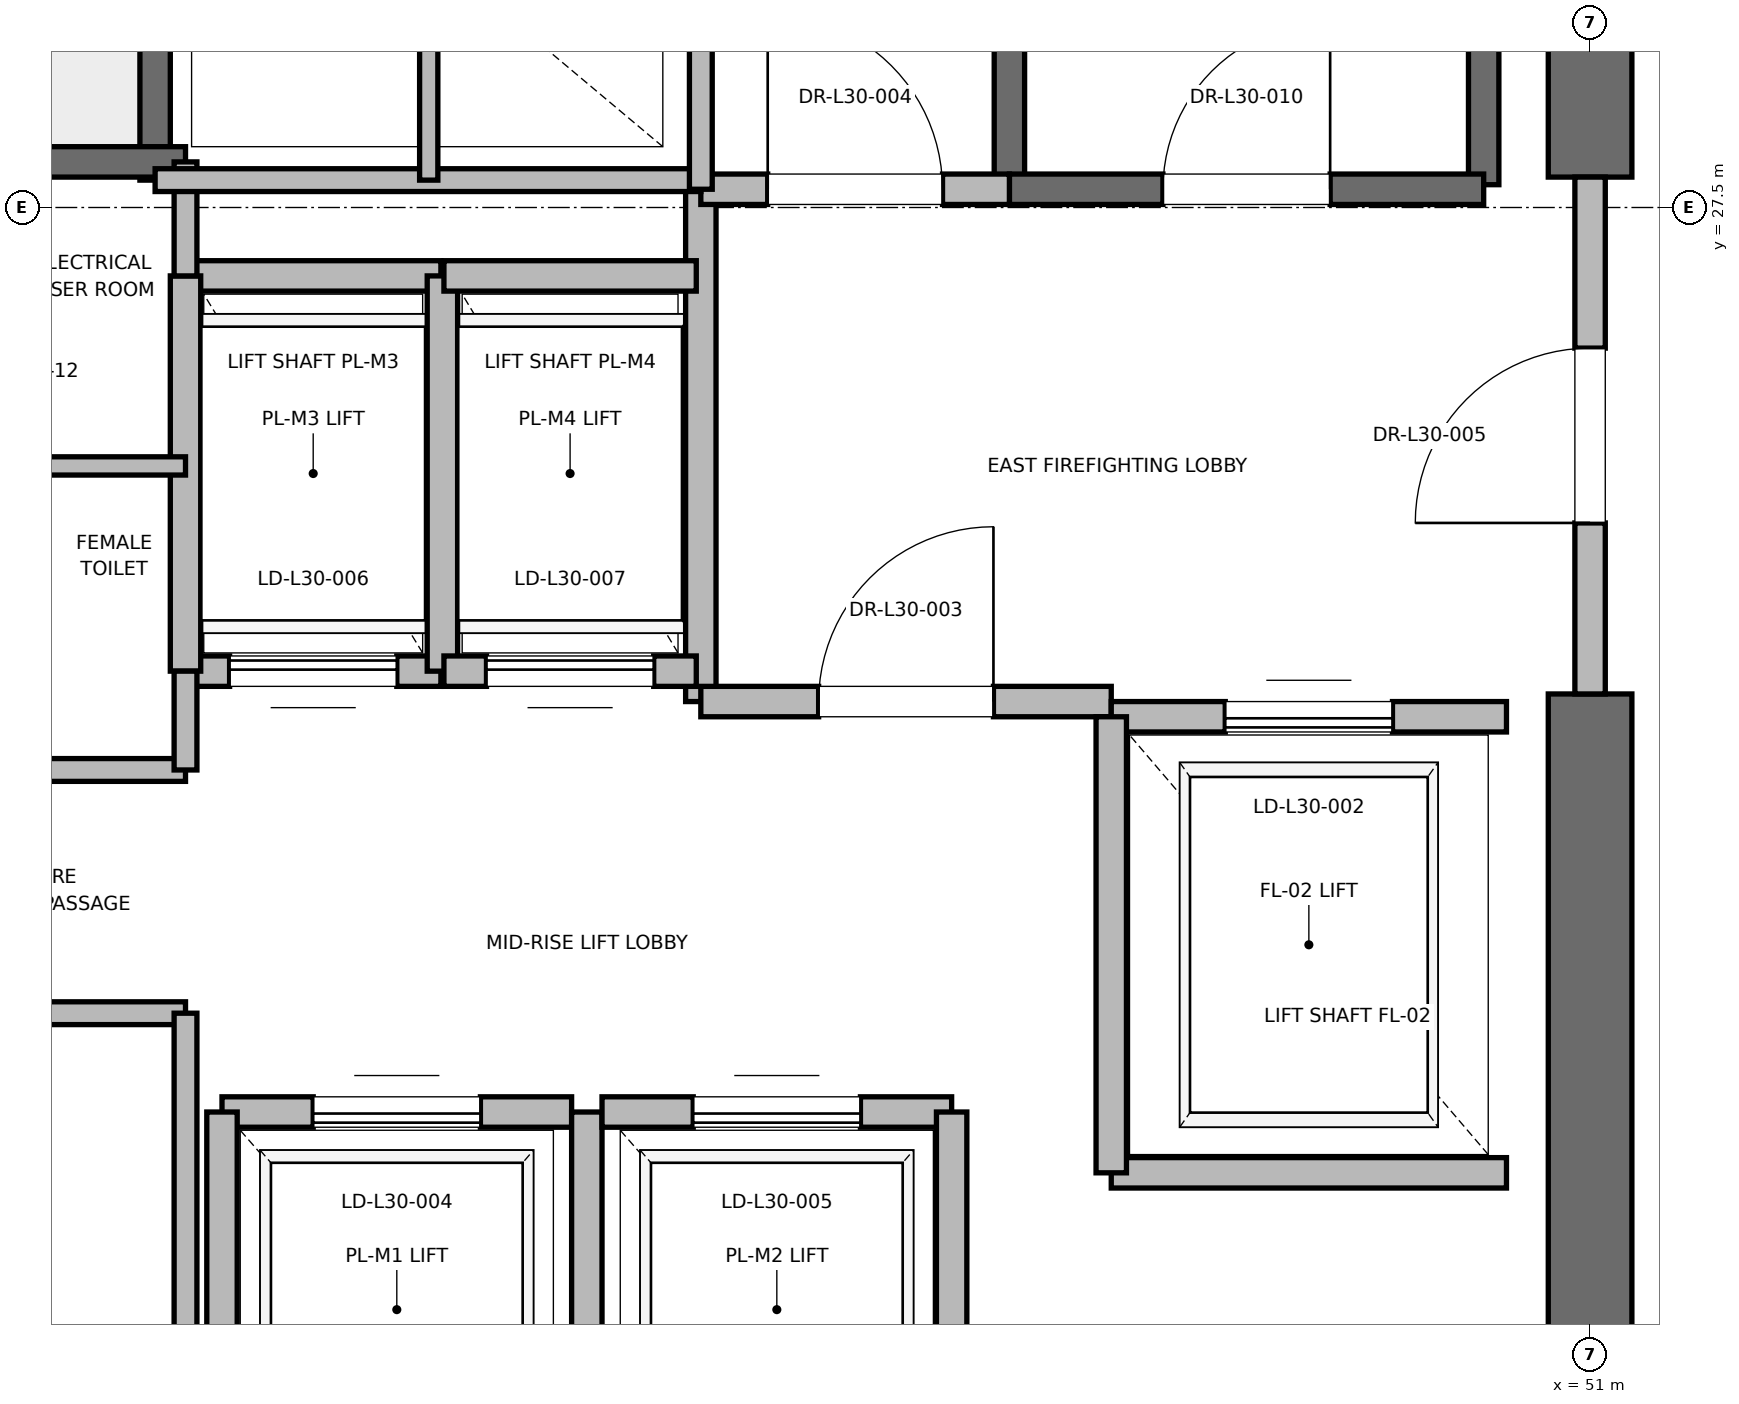
"""IFC4 building model, lengths in metres.
Left out: names, types, materials, properties, quantities, classifications, styles, units other than length and angle.
Written with IfcOpenShell. Run it as: python <this file> out.ifc"""

import sys

from ifc_helpers import new_model, si_unit, direction, frame, frame_2d, origin, place, context, subcontext, project, spatial, rectangle, extrude, element, fill, save


model = new_model("IFC4")
c1 = context("Model", 3, precision=1e-05, world=origin(), true_north=direction((0.0, 1.0)))
c2 = subcontext(c1, "Body", "Model", "MODEL_VIEW")
j1 = project(units=[si_unit("LENGTHUNIT", "METRE"), si_unit("PLANEANGLEUNIT", "RADIAN")], contexts=[c1])
p1 = place(None, origin())
s1 = spatial("IfcSite", under=j1, at=p1, CompositionType="ELEMENT")
p2 = place(p1, origin())
s2 = spatial("IfcBuilding", under=s1, at=p2, CompositionType="ELEMENT")
p3 = place(p2, frame((0.0, 0.0, 132.4)))
s3 = spatial("IfcBuildingStorey", under=s2, at=p3, CompositionType="ELEMENT", Elevation=132.4)
p4 = place(p3, frame((51.0, 18.5, 0.0), z_axis=(0.0, 0.0, 1.0), x_axis=(0.0, 1.0, 0.0)))
e1 = element("IfcWall", 1, at=p4, inside=s3, PredefinedType="SHEAR", context=c2, shape_type="SweptSolid", body=[
    extrude(rectangle(XDim=5.8, YDim=0.55, at=frame_2d((2.9, 0.0))), origin(), (0.0, 0.0, 1.0), 3.775),
])
p5 = place(p3, frame((51.0, 27.7, 0.0), z_axis=(0.0, 0.0, 1.0), x_axis=(0.0, 1.0, 0.0)))
e2 = element("IfcWall", 2, at=p5, inside=s3, PredefinedType="SHEAR", context=c2, shape_type="SweptSolid", body=[
    extrude(rectangle(XDim=8.8, YDim=0.55, at=frame_2d((4.4, 0.0))), origin(), (0.0, 0.0, 1.0), 3.775),
])
p6 = place(p3, frame((50.3, 27.65, 0.0), z_axis=(0.0, 0.0, 1.0), x_axis=(0.0, 1.0, 0.0)))
e3 = element("IfcWall", 3, at=p6, inside=s3, PredefinedType="SOLIDWALL", context=c2, shape_type="SweptSolid", body=[
    extrude(rectangle(XDim=8.15, YDim=0.2, at=frame_2d((4.075, 0.0))), origin(), (0.0, 0.0, 1.0), 3.775),
])
p7 = place(p3, frame((47.18, 27.62, 0.0), z_axis=(0.0, 0.0, 1.0), x_axis=(0.0, 1.0, 0.0)))
e4 = element("IfcWall", 4, at=p7, inside=s3, PredefinedType="SOLIDWALL", context=c2, shape_type="SweptSolid", body=[
    extrude(rectangle(XDim=8.18, YDim=0.2, at=frame_2d((4.09, 0.0))), origin(), (0.0, 0.0, 1.0), 3.775),
])
p8 = place(p3, frame((47.18, 27.62, 0.0), z_axis=(0.0, 0.0, 1.0), x_axis=(1.0, 0.0, 0.0)))
e5 = element("IfcWall", 5, at=p8, inside=s3, PredefinedType="SOLIDWALL", context=c2, shape_type="SweptSolid", body=[
    extrude(rectangle(XDim=3.12, YDim=0.2, at=frame_2d((1.56, 0.0))), origin(), (0.0, 0.0, 1.0), 3.775),
])
p9 = place(p8, frame((1.01, 0.0, 0.0)))
e6 = element("IfcOpeningElement", 6, at=p9, cuts=e5, PredefinedType="OPENING", context=c2, shape_type="SweptSolid", body=[
    extrude(rectangle(XDim=1.1, YDim=2.15, at=frame_2d((0.55, 1.075))), frame((0.0, 0.1, 0.0), z_axis=(0.0, -1.0, 0.0), x_axis=(1.0, 0.0, 0.0)), (0.0, 0.0, 1.0), 0.2),
])
p10 = place(p3, frame((41.56, 27.68, 0.0), z_axis=(0.0, 0.0, 1.0), x_axis=(0.0, 1.0, 0.0)))
e7 = element("IfcWall", 7, at=p10, inside=s3, PredefinedType="SOLIDWALL", context=c2, shape_type="SweptSolid", body=[
    extrude(rectangle(XDim=8.57, YDim=0.2, at=frame_2d((4.285, 0.0))), origin(), (0.0, 0.0, 1.0), 3.775),
])
p11 = place(p3, frame((38.44, 27.8, 0.0), z_axis=(0.0, 0.0, 1.0), x_axis=(1.0, 0.0, 0.0)))
e8 = element("IfcWall", 8, at=p11, inside=s3, PredefinedType="SOLIDWALL", context=c2, shape_type="SweptSolid", body=[
    extrude(rectangle(XDim=3.32, YDim=0.2, at=frame_2d((1.66, 0.0))), origin(), (0.0, 0.0, 1.0), 3.775),
])
p12 = place(p3, frame((45.15, 24.25, 0.0), z_axis=(0.0, 0.0, 1.0), x_axis=(0.0, 1.0, 0.0)))
e9 = element("IfcWall", 9, at=p12, inside=s3, PredefinedType="PARTITIONING", context=c2, shape_type="SweptSolid", body=[
    extrude(rectangle(XDim=3.37, YDim=0.2, at=frame_2d((1.685, 0.0))), origin(), (0.0, 0.0, 1.0), 3.775),
])
p13 = place(p3, frame((45.15, 24.25, 0.0), z_axis=(0.0, 0.0, 1.0), x_axis=(1.0, 0.0, 0.0)))
e10 = element("IfcWall", 10, at=p13, inside=s3, PredefinedType="PARTITIONING", context=c2, shape_type="SweptSolid", body=[
    extrude(rectangle(XDim=2.7, YDim=0.2, at=frame_2d((1.35, 0.0))), origin(), (0.0, 0.0, 1.0), 3.775),
])
p14 = place(p13, frame((0.775, 0.0, 0.0)))
e11 = element("IfcOpeningElement", 11, at=p14, cuts=e10, PredefinedType="OPENING", context=c2, shape_type="SweptSolid", body=[
    extrude(rectangle(XDim=1.15, YDim=2.2, at=frame_2d((0.575, 1.1))), frame((0.0, 0.1, 0.0), z_axis=(0.0, -1.0, 0.0), x_axis=(1.0, 0.0, 0.0)), (0.0, 0.0, 1.0), 0.2),
])
p15 = place(p3, frame((45.15, 27.62, 0.0), z_axis=(0.0, 0.0, 1.0), x_axis=(1.0, 0.0, 0.0)))
e12 = element("IfcWall", 12, at=p15, inside=s3, PredefinedType="PARTITIONING", context=c2, shape_type="SweptSolid", body=[
    extrude(rectangle(XDim=2.03, YDim=0.2, at=frame_2d((1.015, 0.0))), origin(), (0.0, 0.0, 1.0), 3.775),
])
p16 = place(p15, frame((0.44, 0.0, 0.0)))
e13 = element("IfcOpeningElement", 13, at=p16, cuts=e12, PredefinedType="OPENING", context=c2, shape_type="SweptSolid", body=[
    extrude(rectangle(XDim=1.15, YDim=2.2, at=frame_2d((0.575, 1.1))), frame((0.0, 0.1, 0.0), z_axis=(0.0, -1.0, 0.0), x_axis=(1.0, 0.0, 0.0)), (0.0, 0.0, 1.0), 0.2),
])
p17 = place(p3, frame((51.0, 24.3, 0.0), z_axis=(0.0, 0.0, 1.0), x_axis=(0.0, 1.0, 0.0)))
e14 = element("IfcWall", 14, at=p17, inside=s3, PredefinedType="PARTITIONING", context=c2, shape_type="SweptSolid", body=[
    extrude(rectangle(XDim=3.4, YDim=0.2, at=frame_2d((1.7, 0.0))), origin(), (0.0, 0.0, 1.0), 2.755),
])
p18 = place(p17, frame((1.125, 0.0, 0.0)))
e15 = element("IfcOpeningElement", 15, at=p18, cuts=e14, PredefinedType="OPENING", context=c2, shape_type="SweptSolid", body=[
    extrude(rectangle(XDim=1.15, YDim=2.2, at=frame_2d((0.575, 1.1))), frame((0.0, 0.1, 0.0), z_axis=(0.0, -1.0, 0.0), x_axis=(1.0, 0.0, 0.0)), (0.0, 0.0, 1.0), 0.2),
])
p19 = place(p3, frame((47.85, 21.15, 0.0), z_axis=(0.0, 0.0, 1.0), x_axis=(1.0, 0.0, 0.0)))
e16 = element("IfcWall", 16, at=p19, inside=s3, PredefinedType="SOLIDWALL", context=c2, shape_type="SweptSolid", body=[
    extrude(rectangle(XDim=2.6, YDim=0.2, at=frame_2d((1.3, 0.0))), origin(), (0.0, 0.0, 1.0), 3.775),
])
p20 = place(p3, frame((50.45, 24.15, 0.0), z_axis=(0.0, 0.0, 1.0), x_axis=(-1.0, 0.0, 0.0)))
e17 = element("IfcWall", 17, at=p20, inside=s3, PredefinedType="SOLIDWALL", context=c2, shape_type="SweptSolid", body=[
    extrude(rectangle(XDim=2.6, YDim=0.2, at=frame_2d((1.3, 0.0))), origin(), (0.0, 0.0, 1.0), 2.755),
])
p21 = place(p20, frame((0.75, 0.0, 0.0)))
e18 = element("IfcOpeningElement", 18, at=p21, cuts=e17, PredefinedType="OPENING", context=c2, shape_type="SweptSolid", body=[
    extrude(rectangle(XDim=1.1, YDim=2.2, at=frame_2d((0.55, 1.1))), frame((0.0, 0.1, 0.0), z_axis=(0.0, -1.0, 0.0), x_axis=(1.0, 0.0, 0.0)), (0.0, 0.0, 1.0), 0.2),
])
p22 = place(p3, frame((47.85, 24.15, 0.0), z_axis=(0.0, 0.0, 1.0), x_axis=(0.0, -1.0, 0.0)))
e19 = element("IfcWall", 19, at=p22, inside=s3, PredefinedType="SOLIDWALL", context=c2, shape_type="SweptSolid", body=[
    extrude(rectangle(XDim=3.0, YDim=0.2, at=frame_2d((1.5, 0.0))), origin(), (0.0, 0.0, 1.0), 3.775),
])
p23 = place(p3, frame((44.3, 21.55, 0.0), z_axis=(0.0, 0.0, 1.0), x_axis=(-1.0, 0.0, 0.0)))
e20 = element("IfcWall", 20, at=p23, inside=s3, PredefinedType="SOLIDWALL", context=c2, shape_type="SweptSolid", body=[
    extrude(rectangle(XDim=2.3, YDim=0.2, at=frame_2d((1.15, 0.0))), origin(), (0.0, 0.0, 1.0), 3.775),
])
p24 = place(p23, frame((0.6, 0.0, 0.0)))
e21 = element("IfcOpeningElement", 21, at=p24, cuts=e20, PredefinedType="OPENING", context=c2, shape_type="SweptSolid", body=[
    extrude(rectangle(XDim=1.1, YDim=2.2, at=frame_2d((0.55, 1.1))), frame((0.0, 0.1, 0.0), z_axis=(0.0, -1.0, 0.0), x_axis=(1.0, 0.0, 0.0)), (0.0, 0.0, 1.0), 0.2),
])
p25 = place(p3, frame((42.0, 21.55, 0.0), z_axis=(0.0, 0.0, 1.0), x_axis=(0.0, -1.0, 0.0)))
e22 = element("IfcWall", 22, at=p25, inside=s3, PredefinedType="SOLIDWALL", context=c2, shape_type="SweptSolid", body=[
    extrude(rectangle(XDim=2.6, YDim=0.2, at=frame_2d((1.3, 0.0))), origin(), (0.0, 0.0, 1.0), 2.755),
])
p26 = place(p3, frame((44.4, 18.95, 0.0), z_axis=(0.0, 0.0, 1.0), x_axis=(0.0, 1.0, 0.0)))
e23 = element("IfcWall", 23, at=p26, inside=s3, PredefinedType="SOLIDWALL", context=c2, shape_type="SweptSolid", body=[
    extrude(rectangle(XDim=2.6, YDim=0.2, at=frame_2d((1.3, 0.0))), origin(), (0.0, 0.0, 1.0), 3.775),
])
p27 = place(p3, frame((46.8, 21.55, 0.0), z_axis=(0.0, 0.0, 1.0), x_axis=(-1.0, 0.0, 0.0)))
e24 = element("IfcWall", 24, at=p27, inside=s3, PredefinedType="SOLIDWALL", context=c2, shape_type="SweptSolid", body=[
    extrude(rectangle(XDim=2.3, YDim=0.2, at=frame_2d((1.15, 0.0))), origin(), (0.0, 0.0, 1.0), 3.775),
])
p28 = place(p27, frame((0.6, 0.0, 0.0)))
e25 = element("IfcOpeningElement", 25, at=p28, cuts=e24, PredefinedType="OPENING", context=c2, shape_type="SweptSolid", body=[
    extrude(rectangle(XDim=1.1, YDim=2.2, at=frame_2d((0.55, 1.1))), frame((0.0, 0.1, 0.0), z_axis=(0.0, -1.0, 0.0), x_axis=(1.0, 0.0, 0.0)), (0.0, 0.0, 1.0), 0.2),
])
p29 = place(p3, frame((46.8, 18.95, 0.0), z_axis=(0.0, 0.0, 1.0), x_axis=(0.0, 1.0, 0.0)))
e26 = element("IfcWall", 26, at=p29, inside=s3, PredefinedType="SOLIDWALL", context=c2, shape_type="SweptSolid", body=[
    extrude(rectangle(XDim=2.6, YDim=0.2, at=frame_2d((1.3, 0.0))), origin(), (0.0, 0.0, 1.0), 3.775),
])
p30 = place(p3, frame((41.76, 24.45, 0.0), z_axis=(0.0, 0.0, 1.0), x_axis=(1.0, 0.0, 0.0)))
e27 = element("IfcWall", 27, at=p30, inside=s3, PredefinedType="SOLIDWALL", context=c2, shape_type="SweptSolid", body=[
    extrude(rectangle(XDim=1.68, YDim=0.2, at=frame_2d((0.84, 0.0))), origin(), (0.0, 0.0, 1.0), 3.775),
])
p31 = place(p30, frame((0.29, 0.0, 0.0)))
e28 = element("IfcOpeningElement", 28, at=p31, cuts=e27, PredefinedType="OPENING", context=c2, shape_type="SweptSolid", body=[
    extrude(rectangle(XDim=1.1, YDim=2.2, at=frame_2d((0.55, 1.1))), frame((0.0, 0.1, 0.0), z_axis=(0.0, -1.0, 0.0), x_axis=(1.0, 0.0, 0.0)), (0.0, 0.0, 1.0), 0.2),
])
p32 = place(p3, frame((43.44, 27.05, 0.0), z_axis=(0.0, 0.0, 1.0), x_axis=(-1.0, 0.0, 0.0)))
e29 = element("IfcWall", 29, at=p32, inside=s3, PredefinedType="SOLIDWALL", context=c2, shape_type="SweptSolid", body=[
    extrude(rectangle(XDim=1.68, YDim=0.2, at=frame_2d((0.84, 0.0))), origin(), (0.0, 0.0, 1.0), 3.775),
])
for number, where, z_axis, x_axis in (
    (30, (41.76, 27.05, 0.0), (0.0, 0.0, 1.0), (0.0, -1.0, 0.0)),
    (31, (43.45, 24.45, 0.0), (0.0, 0.0, 1.0), (0.0, 1.0, 0.0)),
):
    element("IfcWall", number, at=place(p3, frame(where, z_axis=z_axis, x_axis=x_axis)), inside=s3, PredefinedType="SOLIDWALL", context=c2, shape_type="SweptSolid", body=[
        extrude(rectangle(XDim=2.6, YDim=0.2, at=frame_2d((1.3, 0.0))), origin(), (0.0, 0.0, 1.0), 3.775),
    ])
p33 = place(p3, frame((43.46, 24.45, 0.0), z_axis=(0.0, 0.0, 1.0), x_axis=(1.0, 0.0, 0.0)))
e32 = element("IfcWall", 32, at=p33, inside=s3, PredefinedType="SOLIDWALL", context=c2, shape_type="SweptSolid", body=[
    extrude(rectangle(XDim=1.66, YDim=0.2, at=frame_2d((0.83, 0.0))), origin(), (0.0, 0.0, 1.0), 3.775),
])
p34 = place(p33, frame((0.28, 0.0, 0.0)))
e33 = element("IfcOpeningElement", 33, at=p34, cuts=e32, PredefinedType="OPENING", context=c2, shape_type="SweptSolid", body=[
    extrude(rectangle(XDim=1.1, YDim=2.2, at=frame_2d((0.55, 1.1))), frame((0.0, 0.1, 0.0), z_axis=(0.0, -1.0, 0.0), x_axis=(1.0, 0.0, 0.0)), (0.0, 0.0, 1.0), 0.2),
])
p35 = place(p3, frame((45.12, 27.05, 0.0), z_axis=(0.0, 0.0, 1.0), x_axis=(-1.0, 0.0, 0.0)))
e34 = element("IfcWall", 34, at=p35, inside=s3, PredefinedType="SOLIDWALL", context=c2, shape_type="SweptSolid", body=[
    extrude(rectangle(XDim=1.66, YDim=0.2, at=frame_2d((0.83, 0.0))), origin(), (0.0, 0.0, 1.0), 3.775),
])
for number, where, z_axis, x_axis in (
    (35, (39.95, 22.2, 0.0), (0.0, 0.0, 1.0), (1.0, 0.0, 0.0)),
    (36, (39.95, 23.8, 0.0), (0.0, 0.0, 1.0), (1.0, 0.0, 0.0)),
):
    element("IfcWall", number, at=place(p3, frame(where, z_axis=z_axis, x_axis=x_axis)), inside=s3, PredefinedType="PARTITIONING", context=c2, shape_type="SweptSolid", body=[
        extrude(rectangle(XDim=1.81, YDim=0.15, at=frame_2d((0.905, 0.0))), origin(), (0.0, 0.0, 1.0), 2.85),
    ])
p36 = place(p3, frame((39.95, 25.8, 0.0), z_axis=(0.0, 0.0, 1.0), x_axis=(1.0, 0.0, 0.0)))
e37 = element("IfcWall", 37, at=p36, inside=s3, PredefinedType="PARTITIONING", context=c2, shape_type="SweptSolid", body=[
    extrude(rectangle(XDim=1.81, YDim=0.12, at=frame_2d((0.905, 0.0))), origin(), (0.0, 0.0, 1.0), 2.85),
])
p37 = place(p3, frame((41.76, 18.6, 0.0), z_axis=(0.0, 0.0, 1.0), x_axis=(0.0, 1.0, 0.0)))
e38 = element("IfcWall", 38, at=p37, inside=s3, PredefinedType="PARTITIONING", context=c2, shape_type="SweptSolid", body=[
    extrude(rectangle(XDim=3.6, YDim=0.15, at=frame_2d((1.8, 0.0))), origin(), (0.0, 0.0, 1.0), 2.755),
])
p38 = place(p3, frame((41.76, 23.8, 0.0), z_axis=(0.0, 0.0, 1.0), x_axis=(0.0, 1.0, 0.0)))
e39 = element("IfcWall", 39, at=p38, inside=s3, PredefinedType="PARTITIONING", context=c2, shape_type="SweptSolid", body=[
    extrude(rectangle(XDim=0.65, YDim=0.15, at=frame_2d((0.325, 0.0))), origin(), (0.0, 0.0, 1.0), 2.85),
])
p39 = place(p3, frame((41.76, 27.05, 0.0), z_axis=(0.0, 0.0, 1.0), x_axis=(0.0, 1.0, 0.0)))
e40 = element("IfcWall", 40, at=p39, inside=s3, PredefinedType="PARTITIONING", context=c2, shape_type="SweptSolid", body=[
    extrude(rectangle(XDim=0.75, YDim=0.15, at=frame_2d((0.375, 0.0))), origin(), (0.0, 0.0, 1.0), 2.85),
])
p40 = place(p3, frame((41.56, 27.68, 0.0), z_axis=(0.0, 0.0, 1.0), x_axis=(1.0, 0.0, 0.0)))
e41 = element("IfcWall", 41, at=p40, inside=s3, PredefinedType="PARTITIONING", context=c2, shape_type="SweptSolid", body=[
    extrude(rectangle(XDim=3.59, YDim=0.15, at=frame_2d((1.795, 0.0))), origin(), (0.0, 0.0, 1.0), 2.85),
])
p41 = place(p3, frame((45.15, 27.62, 0.0), z_axis=(0.0, 0.0, 1.0), x_axis=(0.0, 1.0, 0.0)))
e42 = element("IfcWall", 42, at=p41, inside=s3, PredefinedType="PARTITIONING", context=c2, shape_type="SweptSolid", body=[
    extrude(rectangle(XDim=3.1, YDim=0.15, at=frame_2d((1.55, 0.0))), origin(), (0.0, 0.0, 1.0), 2.85),
])
p42 = place(p3, frame((43.36, 27.68, 0.0), z_axis=(0.0, 0.0, 1.0), x_axis=(0.0, 1.0, 0.0)))
e43 = element("IfcWall", 43, at=p42, inside=s3, PredefinedType="PARTITIONING", context=c2, shape_type="SweptSolid", body=[
    extrude(rectangle(XDim=3.04, YDim=0.12, at=frame_2d((1.52, 0.0))), origin(), (0.0, 0.0, 1.0), 2.85),
])
p43 = place(p9, origin())
e44 = element("IfcDoor", 44, at=p43, inside=s3, OperationType="SINGLE_SWING_RIGHT", PredefinedType="DOOR", context=c2, shape_type="SweptSolid", body=[
    extrude(rectangle(XDim=1.1, YDim=2.15, at=frame_2d((0.55, 1.075))), frame((0.0, 0.025, 0.0), z_axis=(0.0, -1.0, 0.0), x_axis=(1.0, 0.0, 0.0)), (0.0, 0.0, 1.0), 0.05),
])
fill(e6, e44)
p44 = place(p14, origin())
e45 = element("IfcDoor", 45, at=p44, inside=s3, OperationType="SINGLE_SWING_RIGHT", PredefinedType="DOOR", context=c2, shape_type="SweptSolid", body=[
    extrude(rectangle(XDim=1.15, YDim=2.2, at=frame_2d((0.575, 1.1))), frame((0.0, 0.025, 0.0), z_axis=(0.0, -1.0, 0.0), x_axis=(1.0, 0.0, 0.0)), (0.0, 0.0, 1.0), 0.05),
])
fill(e11, e45)
p45 = place(p16, origin())
e46 = element("IfcDoor", 46, at=p45, inside=s3, OperationType="SINGLE_SWING_LEFT", PredefinedType="DOOR", context=c2, shape_type="SweptSolid", body=[
    extrude(rectangle(XDim=1.15, YDim=2.2, at=frame_2d((0.575, 1.1))), frame((0.0, 0.025, 0.0), z_axis=(0.0, -1.0, 0.0), x_axis=(1.0, 0.0, 0.0)), (0.0, 0.0, 1.0), 0.05),
])
fill(e13, e46)
p46 = place(p18, origin())
e47 = element("IfcDoor", 47, at=p46, inside=s3, OperationType="SINGLE_SWING_LEFT", PredefinedType="DOOR", context=c2, shape_type="SweptSolid", body=[
    extrude(rectangle(XDim=1.15, YDim=2.2, at=frame_2d((0.575, 1.1))), frame((0.0, 0.025, 0.0), z_axis=(0.0, -1.0, 0.0), x_axis=(1.0, 0.0, 0.0)), (0.0, 0.0, 1.0), 0.05),
])
fill(e15, e47)
p47 = place(p21, origin())
e48 = element("IfcDoor", 48, at=p47, inside=s3, OperationType="SLIDING_TO_RIGHT", PredefinedType="DOOR", context=c2, shape_type="SweptSolid", body=[
    extrude(rectangle(XDim=1.1, YDim=2.2, at=frame_2d((0.55, 1.1))), frame((0.0, 0.025, 0.0), z_axis=(0.0, -1.0, 0.0), x_axis=(1.0, 0.0, 0.0)), (0.0, 0.0, 1.0), 0.05),
])
fill(e18, e48)
p48 = place(p24, origin())
e49 = element("IfcDoor", 49, at=p48, inside=s3, OperationType="SLIDING_TO_RIGHT", PredefinedType="DOOR", context=c2, shape_type="SweptSolid", body=[
    extrude(rectangle(XDim=1.1, YDim=2.2, at=frame_2d((0.55, 1.1))), frame((0.0, 0.025, 0.0), z_axis=(0.0, -1.0, 0.0), x_axis=(1.0, 0.0, 0.0)), (0.0, 0.0, 1.0), 0.05),
])
fill(e21, e49)
p49 = place(p28, origin())
e50 = element("IfcDoor", 50, at=p49, inside=s3, OperationType="SLIDING_TO_RIGHT", PredefinedType="DOOR", context=c2, shape_type="SweptSolid", body=[
    extrude(rectangle(XDim=1.1, YDim=2.2, at=frame_2d((0.55, 1.1))), frame((0.0, 0.025, 0.0), z_axis=(0.0, -1.0, 0.0), x_axis=(1.0, 0.0, 0.0)), (0.0, 0.0, 1.0), 0.05),
])
fill(e25, e50)
p50 = place(p31, origin())
e51 = element("IfcDoor", 51, at=p50, inside=s3, OperationType="SLIDING_TO_RIGHT", PredefinedType="DOOR", context=c2, shape_type="SweptSolid", body=[
    extrude(rectangle(XDim=1.1, YDim=2.2, at=frame_2d((0.55, 1.1))), frame((0.0, 0.025, 0.0), z_axis=(0.0, -1.0, 0.0), x_axis=(1.0, 0.0, 0.0)), (0.0, 0.0, 1.0), 0.05),
])
fill(e28, e51)
p51 = place(p34, origin())
e52 = element("IfcDoor", 52, at=p51, inside=s3, OperationType="SLIDING_TO_RIGHT", PredefinedType="DOOR", context=c2, shape_type="SweptSolid", body=[
    extrude(rectangle(XDim=1.1, YDim=2.2, at=frame_2d((0.55, 1.1))), frame((0.0, 0.025, 0.0), z_axis=(0.0, -1.0, 0.0), x_axis=(1.0, 0.0, 0.0)), (0.0, 0.0, 1.0), 0.05),
])
fill(e33, e52)
save(model, sys.argv[1])
